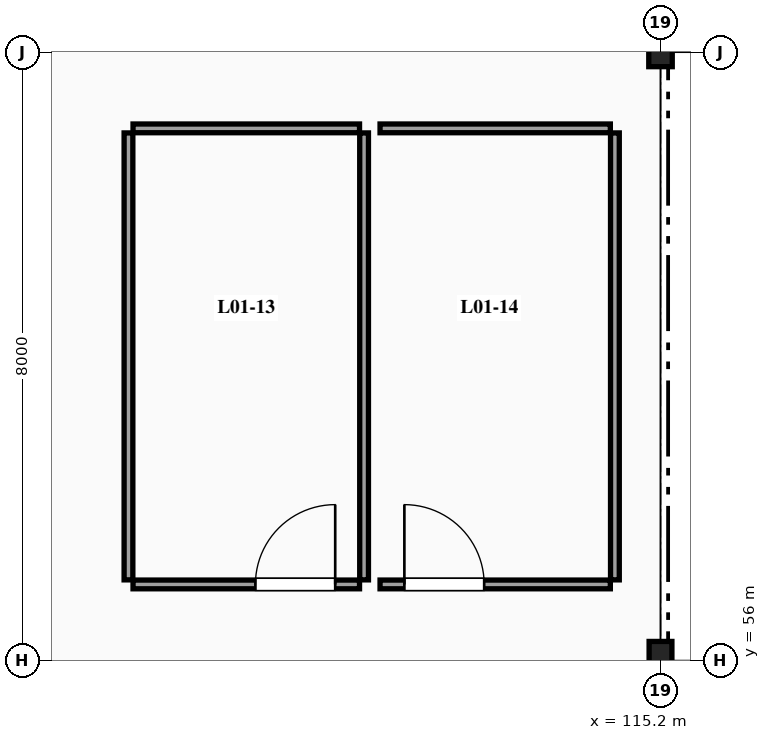
"""IFC4 building model, lengths in metres.
Left out: names, types, materials, properties, quantities, classifications, styles, units other than length and angle.
Written with IfcOpenShell. Run it as: python <this file> out.ifc"""

import sys

from ifc_helpers import new_model, si_unit, direction, frame, frame_2d, origin, origin_2d, place, context, subcontext, project, spatial, rectangle, i_section, extrude, element, fill, save


model = new_model("IFC4")
c1 = context("Model", 3, precision=1e-05, world=origin(), true_north=direction((0.0, 1.0)))
c2 = subcontext(c1, "Body", "Model", "MODEL_VIEW")
j1 = project(units=[si_unit("LENGTHUNIT", "METRE"), si_unit("PLANEANGLEUNIT", "RADIAN")], contexts=[c1])
p1 = place(None, origin())
s1 = spatial("IfcSite", under=j1, at=p1, CompositionType="ELEMENT")
p2 = place(p1, origin())
s2 = spatial("IfcBuilding", under=s1, at=p2, CompositionType="ELEMENT")
p3 = place(p2, frame((0.0, 0.0, 4.5)))
s3 = spatial("IfcBuildingStorey", under=s2, at=p3, CompositionType="ELEMENT", Elevation=4.5)
p4 = place(p3, frame((115.2, 56.0, -0.26), z_axis=(0.0, 0.0, 1.0), x_axis=(1.0, 0.0, 0.0)))
e1 = element("IfcColumn", 1, at=p4, inside=s3, PredefinedType="COLUMN", context=c2, shape_type="SweptSolid", body=[
    extrude(i_section(OverallWidth=0.3, OverallDepth=0.5, WebThickness=0.014, FlangeThickness=0.028, FilletRadius=0.027, at=origin_2d()), origin(), (0.0, 0.0, 1.0), 4.2),
])
p5 = place(p3, frame((115.2, 64.0, -0.26), z_axis=(0.0, 0.0, 1.0), x_axis=(1.0, 0.0, 0.0)))
e2 = element("IfcColumn", 2, at=p5, inside=s3, PredefinedType="COLUMN", context=c2, shape_type="SweptSolid", body=[
    extrude(i_section(OverallWidth=0.309, OverallDepth=0.377, WebThickness=0.021, FlangeThickness=0.04, FilletRadius=0.027, at=origin_2d()), origin(), (0.0, 0.0, 1.0), 4.2),
])
p6 = place(p3, frame((108.26, 63.0, 0.0), z_axis=(0.0, 0.0, 1.0), x_axis=(1.0, 0.0, 0.0)))
e3 = element("IfcWall", 3, at=p6, inside=s3, PredefinedType="PARTITIONING", context=c2, shape_type="SweptSolid", body=[
    extrude(rectangle(XDim=2.98, YDim=0.115, at=frame_2d((1.49, 0.0))), origin(), (0.0, 0.0, 1.0), 3.1),
])
p7 = place(p3, frame((108.26, 57.0, 0.0), z_axis=(0.0, 0.0, 1.0), x_axis=(1.0, 0.0, 0.0)))
e4 = element("IfcWall", 4, at=p7, inside=s3, PredefinedType="PARTITIONING", context=c2, shape_type="SweptSolid", body=[
    extrude(rectangle(XDim=2.98, YDim=0.115, at=frame_2d((1.49, 0.0))), origin(), (0.0, 0.0, 1.0), 3.1),
])
p8 = place(p7, frame((1.61, 0.0, 0.0)))
e5 = element("IfcOpeningElement", 5, at=p8, cuts=e4, PredefinedType="OPENING", context=c2, shape_type="SweptSolid", body=[
    extrude(rectangle(XDim=1.05, YDim=2.15, at=frame_2d((0.525, 1.075))), frame((0.0, 0.067, 0.0), z_axis=(0.0, -1.0, 0.0), x_axis=(1.0, 0.0, 0.0)), (0.0, 0.0, 1.0), 0.135),
])
for number, where, z_axis, x_axis in (
    (6, (108.2, 57.06, 0.0), (0.0, 0.0, 1.0), (0.0, 1.0, 0.0)),
    (7, (111.3, 57.06, 0.0), (0.0, 0.0, 1.0), (0.0, 1.0, 0.0)),
):
    element("IfcWall", number, at=place(p3, frame(where, z_axis=z_axis, x_axis=x_axis)), inside=s3, PredefinedType="PARTITIONING", context=c2, shape_type="SweptSolid", body=[
        extrude(rectangle(XDim=5.88, YDim=0.115, at=frame_2d((2.94, 0.0))), origin(), (0.0, 0.0, 1.0), 3.1),
    ])
p9 = place(p3, frame((111.51, 63.0, 0.0), z_axis=(0.0, 0.0, 1.0), x_axis=(1.0, 0.0, 0.0)))
e8 = element("IfcWall", 8, at=p9, inside=s3, PredefinedType="PARTITIONING", context=c2, shape_type="SweptSolid", body=[
    extrude(rectangle(XDim=3.03, YDim=0.115, at=frame_2d((1.515, 0.0))), origin(), (0.0, 0.0, 1.0), 3.1),
])
p10 = place(p3, frame((111.51, 57.0, 0.0), z_axis=(0.0, 0.0, 1.0), x_axis=(1.0, 0.0, 0.0)))
e9 = element("IfcWall", 9, at=p10, inside=s3, PredefinedType="PARTITIONING", context=c2, shape_type="SweptSolid", body=[
    extrude(rectangle(XDim=3.03, YDim=0.115, at=frame_2d((1.515, 0.0))), origin(), (0.0, 0.0, 1.0), 3.1),
])
p11 = place(p10, frame((0.32, 0.0, 0.0)))
e10 = element("IfcOpeningElement", 10, at=p11, cuts=e9, PredefinedType="OPENING", context=c2, shape_type="SweptSolid", body=[
    extrude(rectangle(XDim=1.05, YDim=2.15, at=frame_2d((0.525, 1.075))), frame((0.0, 0.067, 0.0), z_axis=(0.0, -1.0, 0.0), x_axis=(1.0, 0.0, 0.0)), (0.0, 0.0, 1.0), 0.135),
])
p12 = place(p3, frame((114.6, 57.06, 0.0), z_axis=(0.0, 0.0, 1.0), x_axis=(0.0, 1.0, 0.0)))
e11 = element("IfcWall", 11, at=p12, inside=s3, PredefinedType="PARTITIONING", context=c2, shape_type="SweptSolid", body=[
    extrude(rectangle(XDim=5.88, YDim=0.115, at=frame_2d((2.94, 0.0))), origin(), (0.0, 0.0, 1.0), 3.1),
])
p13 = place(p8, origin())
e12 = element("IfcDoor", 12, at=p13, inside=s3, OperationType="SINGLE_SWING_RIGHT", PredefinedType="DOOR", context=c2, shape_type="SweptSolid", body=[
    extrude(rectangle(XDim=1.05, YDim=2.15, at=frame_2d((0.525, 1.075))), frame((0.0, 0.025, 0.0), z_axis=(0.0, -1.0, 0.0), x_axis=(1.0, 0.0, 0.0)), (0.0, 0.0, 1.0), 0.05),
])
fill(e5, e12)
p14 = place(p11, origin())
e13 = element("IfcDoor", 13, at=p14, inside=s3, OperationType="SINGLE_SWING_LEFT", PredefinedType="DOOR", context=c2, shape_type="SweptSolid", body=[
    extrude(rectangle(XDim=1.05, YDim=2.15, at=frame_2d((0.525, 1.075))), frame((0.0, 0.025, 0.0), z_axis=(0.0, -1.0, 0.0), x_axis=(1.0, 0.0, 0.0)), (0.0, 0.0, 1.0), 0.05),
])
fill(e10, e13)
save(model, sys.argv[1])
